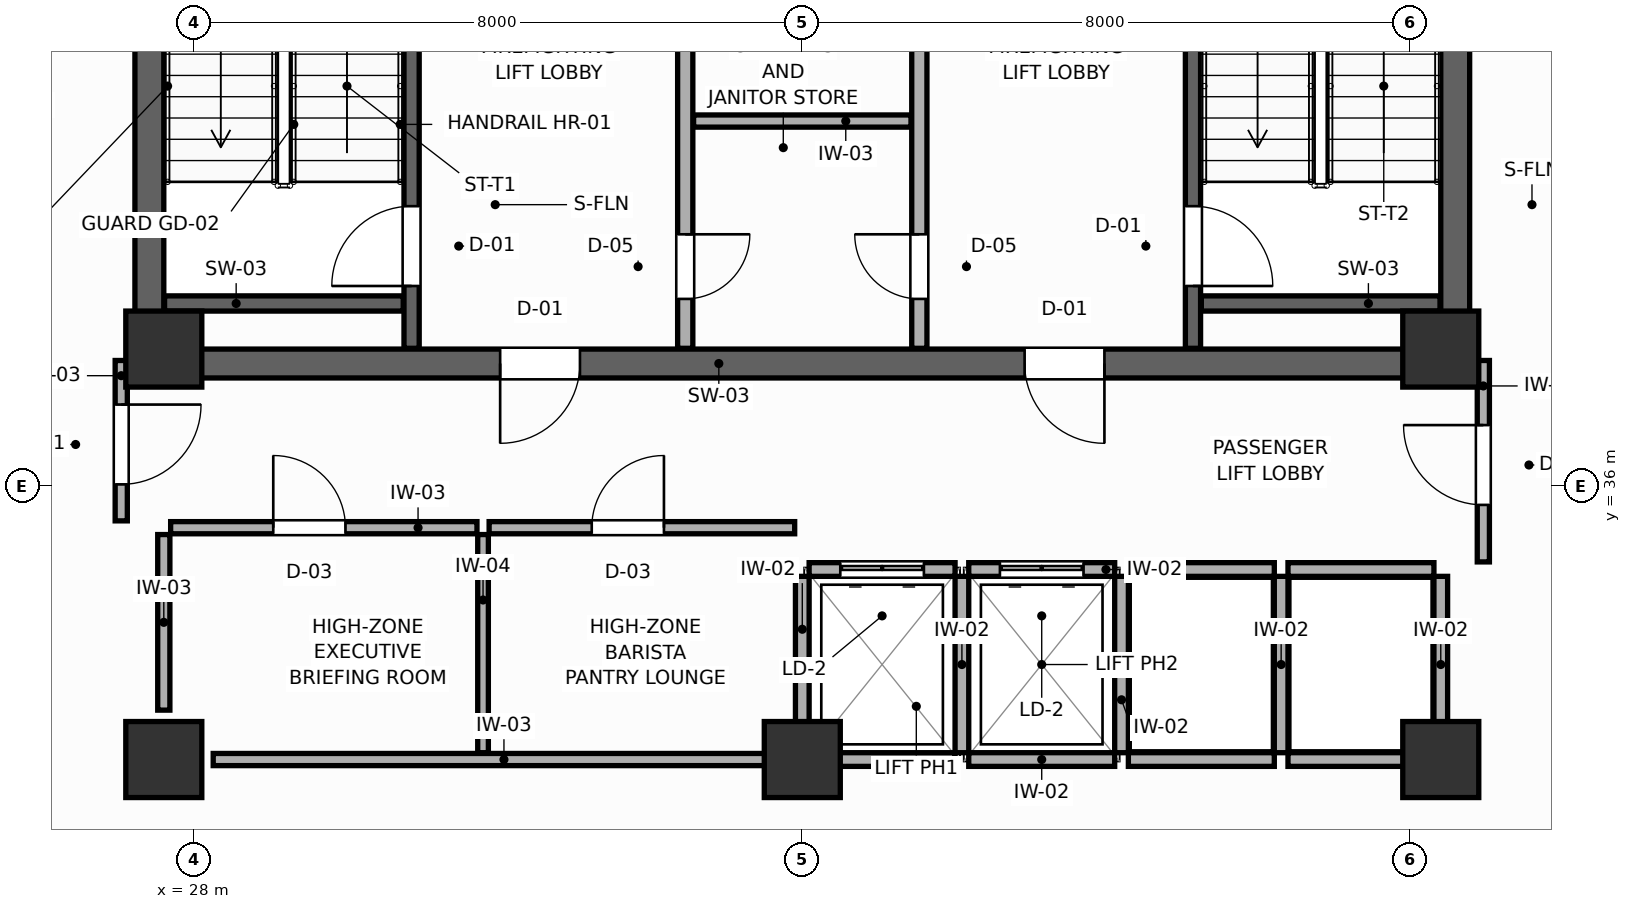
"""IFC4 building model, lengths in metres.
Left out: names, types, materials, properties, quantities, classifications, styles, units other than length and angle.
Written with IfcOpenShell. Run it as: python <this file> out.ifc"""

import sys

from ifc_helpers import new_model, si_unit, direction, frame, frame_2d, origin, origin_2d, place, context, subcontext, project, spatial, rectangle, extrude, source, transform, mapped, element, fill, save


model = new_model("IFC4")
c1 = context("Model", 3, precision=1e-05, world=origin(), true_north=direction((0.0, 1.0)))
c2 = subcontext(c1, "Body", "Model", "MODEL_VIEW")
j1 = project(units=[si_unit("LENGTHUNIT", "METRE"), si_unit("PLANEANGLEUNIT", "RADIAN")], contexts=[c1])
p1 = place(None, origin())
s1 = spatial("IfcSite", under=j1, at=p1, CompositionType="ELEMENT")
p2 = place(p1, origin())
s2 = spatial("IfcBuilding", under=s1, at=p2, CompositionType="ELEMENT")
p3 = place(p2, frame((0.0, 0.0, 209.4)))
s3 = spatial("IfcBuildingStorey", under=s2, at=p3, CompositionType="ELEMENT", Elevation=209.4)
p4 = place(p3, frame((27.22, 37.61, 0.0), z_axis=(0.0, 0.0, 1.0), x_axis=(1.0, 0.0, 0.0)))
e1 = element("IfcWall", 1, at=p4, inside=s3, PredefinedType="SHEAR", context=c2, shape_type="SweptSolid", body=[
    extrude(rectangle(XDim=17.56, YDim=0.38, at=frame_2d((8.78, 0.0))), origin(), (0.0, 0.0, 1.0), 3.6),
])
p5 = place(p4, frame((4.805, 0.0, 0.0)))
e2 = element("IfcOpeningElement", 2, at=p5, cuts=e1, PredefinedType="OPENING", context=c2, shape_type="SweptSolid", body=[
    extrude(rectangle(XDim=1.05, YDim=2.1, at=frame_2d((0.525, 1.05))), frame((0.0, 0.2, 0.0), z_axis=(0.0, -1.0, 0.0), x_axis=(1.0, 0.0, 0.0)), (0.0, 0.0, 1.0), 0.4),
])
p6 = place(p4, frame((11.705, 0.0, 0.0)))
e3 = element("IfcOpeningElement", 3, at=p6, cuts=e1, PredefinedType="OPENING", context=c2, shape_type="SweptSolid", body=[
    extrude(rectangle(XDim=1.05, YDim=2.1, at=frame_2d((0.525, 1.05))), frame((0.0, 0.2, 0.0), z_axis=(0.0, -1.0, 0.0), x_axis=(1.0, 0.0, 0.0)), (0.0, 0.0, 1.0), 0.4),
])
for number, where, z_axis, x_axis in (
    (4, (27.41, 37.8, 0.0), (0.0, 0.0, 1.0), (0.0, 1.0, 0.0)),
    (5, (44.59, 37.8, 0.0), (0.0, 0.0, 1.0), (0.0, 1.0, 0.0)),
):
    element("IfcWall", number, at=place(p3, frame(where, z_axis=z_axis, x_axis=x_axis)), inside=s3, PredefinedType="SHEAR", context=c2, shape_type="SweptSolid", body=[
        extrude(rectangle(XDim=9.0, YDim=0.38, at=frame_2d((4.5, 0.0))), origin(), (0.0, 0.0, 1.0), 3.6),
    ])
m1 = source(origin(), c2, "Body", "SweptSolid", [
    extrude(rectangle(XDim=1.0, YDim=1.0, at=origin_2d()), origin(), (0.0, 0.0, 1.0), 3.6),
])
for number, where, z_axis, x_axis in (
    (6, (27.6, 37.8, 0.0), (0.0, 0.0, 1.0), (1.0, 0.0, 0.0)),
    (7, (44.4, 37.8, 0.0), (0.0, 0.0, 1.0), (1.0, 0.0, 0.0)),
    (8, (27.6, 32.4, 0.0), (0.0, 0.0, 1.0), (1.0, 0.0, 0.0)),
    (9, (44.4, 32.4, 0.0), (0.0, 0.0, 1.0), (1.0, 0.0, 0.0)),
    (10, (36.0, 32.4, 0.0), (0.0, 0.0, 1.0), (1.0, 0.0, 0.0)),
):
    element("IfcColumn", number, at=place(p3, frame(where, z_axis=z_axis, x_axis=x_axis)), inside=s3, PredefinedType="COLUMN", context=c2, shape_type="MappedRepresentation", body=[
        mapped(m1, transform((0.0, 0.0, 0.0), scale=1.0)),
    ])
p7 = place(p3, frame((30.86, 37.81, 0.0), z_axis=(0.0, 0.0, 1.0), x_axis=(0.0, 1.0, 0.0)))
e11 = element("IfcWall", 11, at=p7, inside=s3, PredefinedType="SHEAR", context=c2, shape_type="SweptSolid", body=[
    extrude(rectangle(XDim=8.98, YDim=0.2, at=frame_2d((4.49, 0.0))), origin(), (0.0, 0.0, 1.0), 3.6),
])
p8 = place(p7, frame((0.82, 0.0, 0.0)))
e12 = element("IfcOpeningElement", 12, at=p8, cuts=e11, PredefinedType="OPENING", context=c2, shape_type="SweptSolid", body=[
    extrude(rectangle(XDim=1.05, YDim=2.1, at=frame_2d((0.525, 1.05))), frame((0.0, 0.11, 0.0), z_axis=(0.0, -1.0, 0.0), x_axis=(1.0, 0.0, 0.0)), (0.0, 0.0, 1.0), 0.22),
])
p9 = place(p3, frame((27.61, 38.4, 0.0), z_axis=(0.0, 0.0, 1.0), x_axis=(1.0, 0.0, 0.0)))
e13 = element("IfcWall", 13, at=p9, inside=s3, PredefinedType="SHEAR", context=c2, shape_type="SweptSolid", body=[
    extrude(rectangle(XDim=3.14, YDim=0.2, at=frame_2d((1.57, 0.0))), origin(), (0.0, 0.0, 1.0), 3.6),
])
p10 = place(p3, frame((41.14, 37.81, 0.0), z_axis=(0.0, 0.0, 1.0), x_axis=(0.0, 1.0, 0.0)))
e14 = element("IfcWall", 14, at=p10, inside=s3, PredefinedType="SHEAR", context=c2, shape_type="SweptSolid", body=[
    extrude(rectangle(XDim=8.98, YDim=0.2, at=frame_2d((4.49, 0.0))), origin(), (0.0, 0.0, 1.0), 3.6),
])
p11 = place(p10, frame((0.82, 0.0, 0.0)))
e15 = element("IfcOpeningElement", 15, at=p11, cuts=e14, PredefinedType="OPENING", context=c2, shape_type="SweptSolid", body=[
    extrude(rectangle(XDim=1.05, YDim=2.1, at=frame_2d((0.525, 1.05))), frame((0.0, 0.11, 0.0), z_axis=(0.0, -1.0, 0.0), x_axis=(1.0, 0.0, 0.0)), (0.0, 0.0, 1.0), 0.22),
])
p12 = place(p3, frame((41.25, 38.4, 0.0), z_axis=(0.0, 0.0, 1.0), x_axis=(1.0, 0.0, 0.0)))
e16 = element("IfcWall", 16, at=p12, inside=s3, PredefinedType="SHEAR", context=c2, shape_type="SweptSolid", body=[
    extrude(rectangle(XDim=3.14, YDim=0.2, at=frame_2d((1.57, 0.0))), origin(), (0.0, 0.0, 1.0), 3.6),
])
p13 = place(p3, frame((34.46, 37.81, 0.0), z_axis=(0.0, 0.0, 1.0), x_axis=(0.0, 1.0, 0.0)))
e17 = element("IfcWall", 17, at=p13, inside=s3, PredefinedType="PARTITIONING", context=c2, shape_type="SweptSolid", body=[
    extrude(rectangle(XDim=8.98, YDim=0.2, at=frame_2d((4.49, 0.0))), origin(), (0.0, 0.0, 1.0), 3.41),
])
p14 = place(p13, frame((0.65, 0.0, 0.0)))
e18 = element("IfcOpeningElement", 18, at=p14, cuts=e17, PredefinedType="OPENING", context=c2, shape_type="SweptSolid", body=[
    extrude(rectangle(XDim=0.85, YDim=2.05, at=frame_2d((0.425, 1.025))), frame((0.0, 0.11, 0.0), z_axis=(0.0, -1.0, 0.0), x_axis=(1.0, 0.0, 0.0)), (0.0, 0.0, 1.0), 0.22),
])
p15 = place(p3, frame((37.54, 37.81, 0.0), z_axis=(0.0, 0.0, 1.0), x_axis=(0.0, 1.0, 0.0)))
e19 = element("IfcWall", 19, at=p15, inside=s3, PredefinedType="PARTITIONING", context=c2, shape_type="SweptSolid", body=[
    extrude(rectangle(XDim=8.98, YDim=0.2, at=frame_2d((4.49, 0.0))), origin(), (0.0, 0.0, 1.0), 3.41),
])
p16 = place(p15, frame((0.65, 0.0, 0.0)))
e20 = element("IfcOpeningElement", 20, at=p16, cuts=e19, PredefinedType="OPENING", context=c2, shape_type="SweptSolid", body=[
    extrude(rectangle(XDim=0.85, YDim=2.05, at=frame_2d((0.425, 1.025))), frame((0.0, 0.11, 0.0), z_axis=(0.0, -1.0, 0.0), x_axis=(1.0, 0.0, 0.0)), (0.0, 0.0, 1.0), 0.22),
])
p17 = place(p3, frame((34.57, 40.8, 0.0), z_axis=(0.0, 0.0, 1.0), x_axis=(1.0, 0.0, 0.0)))
e21 = element("IfcWall", 21, at=p17, inside=s3, PredefinedType="PARTITIONING", context=c2, shape_type="SweptSolid", body=[
    extrude(rectangle(XDim=2.86, YDim=0.16, at=frame_2d((1.43, 0.0))), origin(), (0.0, 0.0, 1.0), 3.41),
])
p18 = place(p3, frame((36.09, 34.9, 0.0), z_axis=(0.0, 0.0, 1.0), x_axis=(1.0, 0.0, 0.0)))
e22 = element("IfcWall", 22, at=p18, inside=s3, PredefinedType="PARTITIONING", context=c2, shape_type="SweptSolid", body=[
    extrude(rectangle(XDim=1.92, YDim=0.18, at=frame_2d((0.96, 0.0))), origin(), (0.0, 0.0, 1.0), 3.41),
])
p19 = place(p18, frame((0.41, 0.0, 0.0)))
e23 = element("IfcOpeningElement", 23, at=p19, cuts=e22, PredefinedType="OPENING", context=c2, shape_type="SweptSolid", body=[
    extrude(rectangle(XDim=1.1, YDim=2.1, at=frame_2d((0.55, 1.05))), frame((0.0, 0.1, 0.0), z_axis=(0.0, -1.0, 0.0), x_axis=(1.0, 0.0, 0.0)), (0.0, 0.0, 1.0), 0.2),
])
p20 = place(p3, frame((36.09, 32.4, 0.0), z_axis=(0.0, 0.0, 1.0), x_axis=(1.0, 0.0, 0.0)))
e24 = element("IfcWall", 24, at=p20, inside=s3, PredefinedType="PARTITIONING", context=c2, shape_type="SweptSolid", body=[
    extrude(rectangle(XDim=1.92, YDim=0.18, at=frame_2d((0.96, 0.0))), origin(), (0.0, 0.0, 1.0), 2.96),
])
p21 = place(p3, frame((36.0, 32.49, 0.0), z_axis=(0.0, 0.0, 1.0), x_axis=(0.0, 1.0, 0.0)))
e25 = element("IfcWall", 25, at=p21, inside=s3, PredefinedType="PARTITIONING", context=c2, shape_type="SweptSolid", body=[
    extrude(rectangle(XDim=2.32, YDim=0.18, at=frame_2d((1.16, 0.0))), origin(), (0.0, 0.0, 1.0), 3.41),
])
p22 = place(p3, frame((38.19, 34.9, 0.0), z_axis=(0.0, 0.0, 1.0), x_axis=(1.0, 0.0, 0.0)))
e26 = element("IfcWall", 26, at=p22, inside=s3, PredefinedType="PARTITIONING", context=c2, shape_type="SweptSolid", body=[
    extrude(rectangle(XDim=1.92, YDim=0.18, at=frame_2d((0.96, 0.0))), origin(), (0.0, 0.0, 1.0), 3.41),
])
p23 = place(p22, frame((0.41, 0.0, 0.0)))
e27 = element("IfcOpeningElement", 27, at=p23, cuts=e26, PredefinedType="OPENING", context=c2, shape_type="SweptSolid", body=[
    extrude(rectangle(XDim=1.1, YDim=2.1, at=frame_2d((0.55, 1.05))), frame((0.0, 0.1, 0.0), z_axis=(0.0, -1.0, 0.0), x_axis=(1.0, 0.0, 0.0)), (0.0, 0.0, 1.0), 0.2),
])
p24 = place(p3, frame((38.19, 32.4, 0.0), z_axis=(0.0, 0.0, 1.0), x_axis=(1.0, 0.0, 0.0)))
e28 = element("IfcWall", 28, at=p24, inside=s3, PredefinedType="PARTITIONING", context=c2, shape_type="SweptSolid", body=[
    extrude(rectangle(XDim=1.92, YDim=0.18, at=frame_2d((0.96, 0.0))), origin(), (0.0, 0.0, 1.0), 2.96),
])
p25 = place(p3, frame((38.1, 32.49, 0.0), z_axis=(0.0, 0.0, 1.0), x_axis=(0.0, 1.0, 0.0)))
e29 = element("IfcWall", 29, at=p25, inside=s3, PredefinedType="PARTITIONING", context=c2, shape_type="SweptSolid", body=[
    extrude(rectangle(XDim=2.32, YDim=0.18, at=frame_2d((1.16, 0.0))), origin(), (0.0, 0.0, 1.0), 3.41),
])
p26 = place(p3, frame((40.29, 34.9, 0.0), z_axis=(0.0, 0.0, 1.0), x_axis=(1.0, 0.0, 0.0)))
e30 = element("IfcWall", 30, at=p26, inside=s3, PredefinedType="PARTITIONING", context=c2, shape_type="SweptSolid", body=[
    extrude(rectangle(XDim=1.92, YDim=0.18, at=frame_2d((0.96, 0.0))), origin(), (0.0, 0.0, 1.0), 3.41),
])
p27 = place(p3, frame((40.29, 32.4, 0.0), z_axis=(0.0, 0.0, 1.0), x_axis=(1.0, 0.0, 0.0)))
e31 = element("IfcWall", 31, at=p27, inside=s3, PredefinedType="PARTITIONING", context=c2, shape_type="SweptSolid", body=[
    extrude(rectangle(XDim=1.92, YDim=0.18, at=frame_2d((0.96, 0.0))), origin(), (0.0, 0.0, 1.0), 2.96),
])
p28 = place(p3, frame((40.2, 32.49, 0.0), z_axis=(0.0, 0.0, 1.0), x_axis=(0.0, 1.0, 0.0)))
e32 = element("IfcWall", 32, at=p28, inside=s3, PredefinedType="PARTITIONING", context=c2, shape_type="SweptSolid", body=[
    extrude(rectangle(XDim=2.32, YDim=0.18, at=frame_2d((1.16, 0.0))), origin(), (0.0, 0.0, 1.0), 3.41),
])
p29 = place(p3, frame((42.39, 34.9, 0.0), z_axis=(0.0, 0.0, 1.0), x_axis=(1.0, 0.0, 0.0)))
e33 = element("IfcWall", 33, at=p29, inside=s3, PredefinedType="PARTITIONING", context=c2, shape_type="SweptSolid", body=[
    extrude(rectangle(XDim=1.92, YDim=0.18, at=frame_2d((0.96, 0.0))), origin(), (0.0, 0.0, 1.0), 3.41),
])
p30 = place(p3, frame((42.39, 32.4, 0.0), z_axis=(0.0, 0.0, 1.0), x_axis=(1.0, 0.0, 0.0)))
e34 = element("IfcWall", 34, at=p30, inside=s3, PredefinedType="PARTITIONING", context=c2, shape_type="SweptSolid", body=[
    extrude(rectangle(XDim=1.92, YDim=0.18, at=frame_2d((0.96, 0.0))), origin(), (0.0, 0.0, 1.0), 2.96),
])
for number, where, z_axis, x_axis in (
    (35, (42.3, 32.49, 0.0), (0.0, 0.0, 1.0), (0.0, 1.0, 0.0)),
    (36, (44.4, 32.49, 0.0), (0.0, 0.0, 1.0), (0.0, 1.0, 0.0)),
):
    element("IfcWall", number, at=place(p3, frame(where, z_axis=z_axis, x_axis=x_axis)), inside=s3, PredefinedType="PARTITIONING", context=c2, shape_type="SweptSolid", body=[
        extrude(rectangle(XDim=2.32, YDim=0.18, at=frame_2d((1.16, 0.0))), origin(), (0.0, 0.0, 1.0), 3.41),
    ])
p31 = place(p3, frame((28.25, 32.4, 0.0), z_axis=(0.0, 0.0, 1.0), x_axis=(1.0, 0.0, 0.0)))
e37 = element("IfcWall", 37, at=p31, inside=s3, PredefinedType="PARTITIONING", context=c2, shape_type="SweptSolid", body=[
    extrude(rectangle(XDim=7.65, YDim=0.16, at=frame_2d((3.825, 0.0))), origin(), (0.0, 0.0, 1.0), 2.96),
])
p32 = place(p3, frame((27.6, 33.05, 0.0), z_axis=(0.0, 0.0, 1.0), x_axis=(0.0, 1.0, 0.0)))
e38 = element("IfcWall", 38, at=p32, inside=s3, PredefinedType="PARTITIONING", context=c2, shape_type="SweptSolid", body=[
    extrude(rectangle(XDim=2.31, YDim=0.16, at=frame_2d((1.155, 0.0))), origin(), (0.0, 0.0, 1.0), 3.41),
])
p33 = place(p3, frame((31.8, 32.49, 0.0), z_axis=(0.0, 0.0, 1.0), x_axis=(0.0, 1.0, 0.0)))
e39 = element("IfcWall", 39, at=p33, inside=s3, PredefinedType="PARTITIONING", context=c2, shape_type="SweptSolid", body=[
    extrude(rectangle(XDim=2.87, YDim=0.14, at=frame_2d((1.435, 0.0))), origin(), (0.0, 0.0, 1.0), 3.41),
])
p34 = place(p3, frame((27.69, 35.45, 0.0), z_axis=(0.0, 0.0, 1.0), x_axis=(1.0, 0.0, 0.0)))
e40 = element("IfcWall", 40, at=p34, inside=s3, PredefinedType="PARTITIONING", context=c2, shape_type="SweptSolid", body=[
    extrude(rectangle(XDim=4.03, YDim=0.16, at=frame_2d((2.015, 0.0))), origin(), (0.0, 0.0, 1.0), 3.41),
])
p35 = place(p34, frame((1.35, 0.0, 0.0)))
e41 = element("IfcOpeningElement", 41, at=p35, cuts=e40, PredefinedType="OPENING", context=c2, shape_type="SweptSolid", body=[
    extrude(rectangle(XDim=0.95, YDim=2.05, at=frame_2d((0.475, 1.025))), frame((0.0, 0.09, 0.0), z_axis=(0.0, -1.0, 0.0), x_axis=(1.0, 0.0, 0.0)), (0.0, 0.0, 1.0), 0.18),
])
p36 = place(p3, frame((31.88, 35.45, 0.0), z_axis=(0.0, 0.0, 1.0), x_axis=(1.0, 0.0, 0.0)))
e42 = element("IfcWall", 42, at=p36, inside=s3, PredefinedType="PARTITIONING", context=c2, shape_type="SweptSolid", body=[
    extrude(rectangle(XDim=4.02, YDim=0.16, at=frame_2d((2.01, 0.0))), origin(), (0.0, 0.0, 1.0), 3.41),
])
p37 = place(p36, frame((1.35, 0.0, 0.0)))
e43 = element("IfcOpeningElement", 43, at=p37, cuts=e42, PredefinedType="OPENING", context=c2, shape_type="SweptSolid", body=[
    extrude(rectangle(XDim=0.95, YDim=2.05, at=frame_2d((0.475, 1.025))), frame((0.0, 0.09, 0.0), z_axis=(0.0, -1.0, 0.0), x_axis=(1.0, 0.0, 0.0)), (0.0, 0.0, 1.0), 0.18),
])
p38 = place(p3, frame((27.04, 35.54, 0.0), z_axis=(0.0, 0.0, 1.0), x_axis=(0.0, 1.0, 0.0)))
e44 = element("IfcWall", 44, at=p38, inside=s3, PredefinedType="PARTITIONING", context=c2, shape_type="SweptSolid", body=[
    extrude(rectangle(XDim=2.11, YDim=0.16, at=frame_2d((1.055, 0.0))), origin(), (0.0, 0.0, 1.0), 3.41),
])
p39 = place(p38, frame((0.48, 0.0, 0.0)))
e45 = element("IfcOpeningElement", 45, at=p39, cuts=e44, PredefinedType="OPENING", context=c2, shape_type="SweptSolid", body=[
    extrude(rectangle(XDim=1.05, YDim=2.1, at=frame_2d((0.525, 1.05))), frame((0.0, 0.09, 0.0), z_axis=(0.0, -1.0, 0.0), x_axis=(1.0, 0.0, 0.0)), (0.0, 0.0, 1.0), 0.18),
])
p40 = place(p3, frame((44.96, 35.0, 0.0), z_axis=(0.0, 0.0, 1.0), x_axis=(0.0, 1.0, 0.0)))
e46 = element("IfcWall", 46, at=p40, inside=s3, PredefinedType="PARTITIONING", context=c2, shape_type="SweptSolid", body=[
    extrude(rectangle(XDim=2.65, YDim=0.16, at=frame_2d((1.325, 0.0))), origin(), (0.0, 0.0, 1.0), 3.41),
])
p41 = place(p40, frame((0.75, 0.0, 0.0)))
e47 = element("IfcOpeningElement", 47, at=p41, cuts=e46, PredefinedType="OPENING", context=c2, shape_type="SweptSolid", body=[
    extrude(rectangle(XDim=1.05, YDim=2.1, at=frame_2d((0.525, 1.05))), frame((0.0, 0.09, 0.0), z_axis=(0.0, -1.0, 0.0), x_axis=(1.0, 0.0, 0.0)), (0.0, 0.0, 1.0), 0.18),
])
p42 = place(p8, origin())
e48 = element("IfcDoor", 48, at=p42, inside=s3, OperationType="SINGLE_SWING_LEFT", PredefinedType="DOOR", context=c2, shape_type="SweptSolid", body=[
    extrude(rectangle(XDim=1.05, YDim=2.1, at=frame_2d((0.525, 1.05))), frame((0.0, 0.025, 0.0), z_axis=(0.0, -1.0, 0.0), x_axis=(1.0, 0.0, 0.0)), (0.0, 0.0, 1.0), 0.05),
])
fill(e12, e48)
p43 = place(p11, frame((1.05, 0.0, 0.0), z_axis=(0.0, 0.0, 1.0), x_axis=(-1.0, 0.0, 0.0)))
e49 = element("IfcDoor", 49, at=p43, inside=s3, OperationType="SINGLE_SWING_RIGHT", PredefinedType="DOOR", context=c2, shape_type="SweptSolid", body=[
    extrude(rectangle(XDim=1.05, YDim=2.1, at=frame_2d((0.525, 1.05))), frame((0.0, 0.025, 0.0), z_axis=(0.0, -1.0, 0.0), x_axis=(1.0, 0.0, 0.0)), (0.0, 0.0, 1.0), 0.05),
])
fill(e15, e49)
p44 = place(p14, frame((0.85, 0.0, 0.0), z_axis=(0.0, 0.0, 1.0), x_axis=(-1.0, 0.0, 0.0)))
e50 = element("IfcDoor", 50, at=p44, inside=s3, OperationType="SINGLE_SWING_LEFT", PredefinedType="DOOR", context=c2, shape_type="SweptSolid", body=[
    extrude(rectangle(XDim=0.85, YDim=2.05, at=frame_2d((0.425, 1.025))), frame((0.0, 0.025, 0.0), z_axis=(0.0, -1.0, 0.0), x_axis=(1.0, 0.0, 0.0)), (0.0, 0.0, 1.0), 0.05),
])
fill(e18, e50)
p45 = place(p16, origin())
e51 = element("IfcDoor", 51, at=p45, inside=s3, OperationType="SINGLE_SWING_RIGHT", PredefinedType="DOOR", context=c2, shape_type="SweptSolid", body=[
    extrude(rectangle(XDim=0.85, YDim=2.05, at=frame_2d((0.425, 1.025))), frame((0.0, 0.025, 0.0), z_axis=(0.0, -1.0, 0.0), x_axis=(1.0, 0.0, 0.0)), (0.0, 0.0, 1.0), 0.05),
])
fill(e20, e51)
p46 = place(p19, origin())
e52 = element("IfcDoor", 52, at=p46, inside=s3, OperationType="DOUBLE_DOOR_SLIDING", PredefinedType="DOOR", context=c2, shape_type="SweptSolid", body=[
    extrude(rectangle(XDim=1.1, YDim=2.1, at=frame_2d((0.55, 1.05))), frame((0.0, 0.025, 0.0), z_axis=(0.0, -1.0, 0.0), x_axis=(1.0, 0.0, 0.0)), (0.0, 0.0, 1.0), 0.05),
])
fill(e23, e52)
p47 = place(p23, origin())
e53 = element("IfcDoor", 53, at=p47, inside=s3, OperationType="DOUBLE_DOOR_SLIDING", PredefinedType="DOOR", context=c2, shape_type="SweptSolid", body=[
    extrude(rectangle(XDim=1.1, YDim=2.1, at=frame_2d((0.55, 1.05))), frame((0.0, 0.025, 0.0), z_axis=(0.0, -1.0, 0.0), x_axis=(1.0, 0.0, 0.0)), (0.0, 0.0, 1.0), 0.05),
])
fill(e27, e53)
p48 = place(p35, origin())
e54 = element("IfcDoor", 54, at=p48, inside=s3, OperationType="SINGLE_SWING_LEFT", PredefinedType="DOOR", context=c2, shape_type="SweptSolid", body=[
    extrude(rectangle(XDim=0.95, YDim=2.05, at=frame_2d((0.475, 1.025))), frame((0.0, 0.025, 0.0), z_axis=(0.0, -1.0, 0.0), x_axis=(1.0, 0.0, 0.0)), (0.0, 0.0, 1.0), 0.05),
])
fill(e41, e54)
p49 = place(p37, origin())
e55 = element("IfcDoor", 55, at=p49, inside=s3, OperationType="SINGLE_SWING_RIGHT", PredefinedType="DOOR", context=c2, shape_type="SweptSolid", body=[
    extrude(rectangle(XDim=0.95, YDim=2.05, at=frame_2d((0.475, 1.025))), frame((0.0, 0.025, 0.0), z_axis=(0.0, -1.0, 0.0), x_axis=(1.0, 0.0, 0.0)), (0.0, 0.0, 1.0), 0.05),
])
fill(e43, e55)
p50 = place(p39, frame((1.05, 0.0, 0.0), z_axis=(0.0, 0.0, 1.0), x_axis=(-1.0, 0.0, 0.0)))
e56 = element("IfcDoor", 56, at=p50, inside=s3, OperationType="SINGLE_SWING_LEFT", PredefinedType="DOOR", context=c2, shape_type="SweptSolid", body=[
    extrude(rectangle(XDim=1.05, YDim=2.1, at=frame_2d((0.525, 1.05))), frame((0.0, 0.025, 0.0), z_axis=(0.0, -1.0, 0.0), x_axis=(1.0, 0.0, 0.0)), (0.0, 0.0, 1.0), 0.05),
])
fill(e45, e56)
p51 = place(p41, origin())
e57 = element("IfcDoor", 57, at=p51, inside=s3, OperationType="SINGLE_SWING_RIGHT", PredefinedType="DOOR", context=c2, shape_type="SweptSolid", body=[
    extrude(rectangle(XDim=1.05, YDim=2.1, at=frame_2d((0.525, 1.05))), frame((0.0, 0.025, 0.0), z_axis=(0.0, -1.0, 0.0), x_axis=(1.0, 0.0, 0.0)), (0.0, 0.0, 1.0), 0.05),
])
fill(e47, e57)
p52 = place(p5, frame((1.05, 0.0, 0.0), z_axis=(0.0, 0.0, 1.0), x_axis=(-1.0, 0.0, 0.0)))
e58 = element("IfcDoor", 58, at=p52, inside=s3, OperationType="SINGLE_SWING_RIGHT", PredefinedType="DOOR", context=c2, shape_type="SweptSolid", body=[
    extrude(rectangle(XDim=1.05, YDim=2.1, at=frame_2d((0.525, 1.05))), frame((0.0, 0.025, 0.0), z_axis=(0.0, -1.0, 0.0), x_axis=(1.0, 0.0, 0.0)), (0.0, 0.0, 1.0), 0.05),
])
fill(e2, e58)
p53 = place(p6, frame((1.05, 0.0, 0.0), z_axis=(0.0, 0.0, 1.0), x_axis=(-1.0, 0.0, 0.0)))
e59 = element("IfcDoor", 59, at=p53, inside=s3, OperationType="SINGLE_SWING_LEFT", PredefinedType="DOOR", context=c2, shape_type="SweptSolid", body=[
    extrude(rectangle(XDim=1.05, YDim=2.1, at=frame_2d((0.525, 1.05))), frame((0.0, 0.025, 0.0), z_axis=(0.0, -1.0, 0.0), x_axis=(1.0, 0.0, 0.0)), (0.0, 0.0, 1.0), 0.05),
])
fill(e3, e59)
save(model, sys.argv[1])
